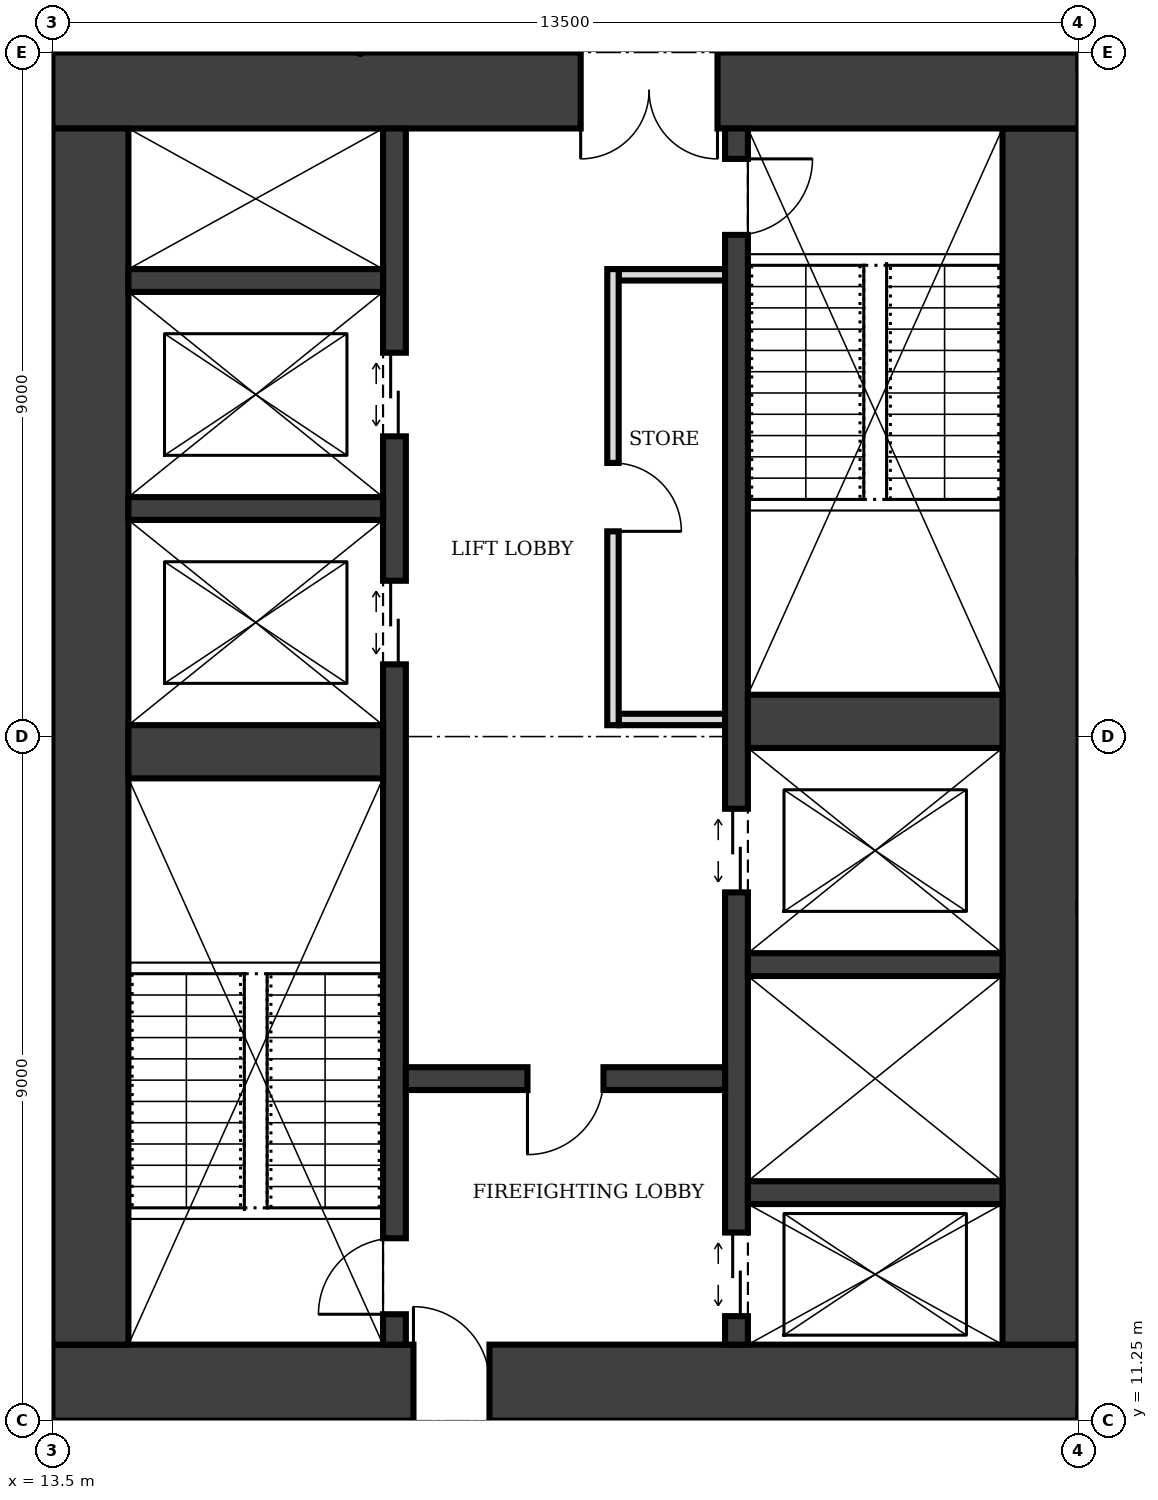
"""IFC4 building model, lengths in metres.
Left out: names, types, materials, properties, quantities, classifications, styles, units other than length and angle.
Written with IfcOpenShell. Run it as: python <this file> out.ifc"""

import sys

from ifc_helpers import new_model, si_unit, direction, frame, frame_2d, origin, place, context, subcontext, project, spatial, rectangle, extrude, element, fill, save


model = new_model("IFC4")
c1 = context("Model", 3, precision=1e-05, world=origin(), true_north=direction((0.0, 1.0)))
c2 = subcontext(c1, "Body", "Model", "MODEL_VIEW")
j1 = project(units=[si_unit("LENGTHUNIT", "METRE"), si_unit("PLANEANGLEUNIT", "RADIAN")], contexts=[c1])
p1 = place(None, origin())
s1 = spatial("IfcSite", under=j1, at=p1, CompositionType="ELEMENT")
p2 = place(p1, origin())
s2 = spatial("IfcBuilding", under=s1, at=p2, CompositionType="ELEMENT")
p3 = place(p2, frame((0.0, 0.0, 101.0)))
s3 = spatial("IfcBuildingStorey", under=s2, at=p3, CompositionType="ELEMENT", Elevation=101.0)
p4 = place(p3, frame((13.5, 11.75, 0.0), z_axis=(0.0, 0.0, 1.0), x_axis=(1.0, 0.0, 0.0)))
e1 = element("IfcWall", 1, at=p4, inside=s3, PredefinedType="SHEAR", context=c2, shape_type="SweptSolid", body=[
    extrude(rectangle(XDim=13.5, YDim=1.0, at=frame_2d((6.75, 0.0))), origin(), (0.0, 0.0, 1.0), 4.0),
])
p5 = place(p4, frame((4.75, 0.0, 0.0)))
e2 = element("IfcOpeningElement", 2, at=p5, cuts=e1, PredefinedType="OPENING", context=c2, shape_type="SweptSolid", body=[
    extrude(rectangle(XDim=1.0, YDim=2.1, at=frame_2d((0.5, 1.05))), frame((0.0, 0.51, 0.0), z_axis=(0.0, -1.0, 0.0), x_axis=(1.0, 0.0, 0.0)), (0.0, 0.0, 1.0), 1.02),
])
p6 = place(p3, frame((26.5, 12.25, 0.0), z_axis=(0.0, 0.0, 1.0), x_axis=(0.0, 1.0, 0.0)))
e3 = element("IfcWall", 3, at=p6, inside=s3, PredefinedType="SHEAR", context=c2, shape_type="SweptSolid", body=[
    extrude(rectangle(XDim=16.0, YDim=1.0, at=frame_2d((8.0, 0.0))), origin(), (0.0, 0.0, 1.0), 4.0),
])
p7 = place(p3, frame((27.0, 28.75, 0.0), z_axis=(0.0, 0.0, 1.0), x_axis=(-1.0, 0.0, 0.0)))
e4 = element("IfcWall", 4, at=p7, inside=s3, PredefinedType="SHEAR", context=c2, shape_type="SweptSolid", body=[
    extrude(rectangle(XDim=13.5, YDim=1.0, at=frame_2d((6.75, 0.0))), origin(), (0.0, 0.0, 1.0), 4.0),
])
p8 = place(p7, frame((4.75, 0.0, 0.0)))
e5 = element("IfcOpeningElement", 5, at=p8, cuts=e4, PredefinedType="OPENING", context=c2, shape_type="SweptSolid", body=[
    extrude(rectangle(XDim=1.8, YDim=2.1, at=frame_2d((0.9, 1.05))), frame((0.0, 0.51, 0.0), z_axis=(0.0, -1.0, 0.0), x_axis=(1.0, 0.0, 0.0)), (0.0, 0.0, 1.0), 1.02),
])
p9 = place(p3, frame((14.0, 28.25, 0.0), z_axis=(0.0, 0.0, 1.0), x_axis=(0.0, -1.0, 0.0)))
e6 = element("IfcWall", 6, at=p9, inside=s3, PredefinedType="SHEAR", context=c2, shape_type="SweptSolid", body=[
    extrude(rectangle(XDim=16.0, YDim=1.0, at=frame_2d((8.0, 0.0))), origin(), (0.0, 0.0, 1.0), 4.0),
])
p10 = place(p3, frame((18.0, 12.25, 0.0), z_axis=(0.0, 0.0, 1.0), x_axis=(0.0, 1.0, 0.0)))
e7 = element("IfcWall", 7, at=p10, inside=s3, PredefinedType="SHEAR", context=c2, shape_type="SweptSolid", body=[
    extrude(rectangle(XDim=16.0, YDim=0.3, at=frame_2d((8.0, 0.0))), origin(), (0.0, 0.0, 1.0), 4.0),
])
p11 = place(p10, frame((0.4, 0.0, 0.0)))
e8 = element("IfcOpeningElement", 8, at=p11, cuts=e7, PredefinedType="OPENING", context=c2, shape_type="SweptSolid", body=[
    extrude(rectangle(XDim=1.0, YDim=2.1, at=frame_2d((0.5, 1.05))), frame((0.0, 0.16, 0.0), z_axis=(0.0, -1.0, 0.0), x_axis=(1.0, 0.0, 0.0)), (0.0, 0.0, 1.0), 0.32),
])
p12 = place(p10, frame((8.95, 0.0, 0.0)))
e9 = element("IfcOpeningElement", 9, at=p12, cuts=e7, PredefinedType="OPENING", context=c2, shape_type="SweptSolid", body=[
    extrude(rectangle(XDim=1.1, YDim=2.1, at=frame_2d((0.55, 1.05))), frame((0.0, 0.16, 0.0), z_axis=(0.0, -1.0, 0.0), x_axis=(1.0, 0.0, 0.0)), (0.0, 0.0, 1.0), 0.32),
])
p13 = place(p10, frame((11.95, 0.0, 0.0)))
e10 = element("IfcOpeningElement", 10, at=p13, cuts=e7, PredefinedType="OPENING", context=c2, shape_type="SweptSolid", body=[
    extrude(rectangle(XDim=1.1, YDim=2.1, at=frame_2d((0.55, 1.05))), frame((0.0, 0.16, 0.0), z_axis=(0.0, -1.0, 0.0), x_axis=(1.0, 0.0, 0.0)), (0.0, 0.0, 1.0), 0.32),
])
p14 = place(p3, frame((22.5, 12.25, 0.0), z_axis=(0.0, 0.0, 1.0), x_axis=(0.0, 1.0, 0.0)))
e11 = element("IfcWall", 11, at=p14, inside=s3, PredefinedType="SHEAR", context=c2, shape_type="SweptSolid", body=[
    extrude(rectangle(XDim=16.0, YDim=0.3, at=frame_2d((8.0, 0.0))), origin(), (0.0, 0.0, 1.0), 4.0),
])
p15 = place(p14, frame((14.6, 0.0, 0.0)))
e12 = element("IfcOpeningElement", 12, at=p15, cuts=e11, PredefinedType="OPENING", context=c2, shape_type="SweptSolid", body=[
    extrude(rectangle(XDim=1.0, YDim=2.1, at=frame_2d((0.5, 1.05))), frame((0.0, 0.16, 0.0), z_axis=(0.0, -1.0, 0.0), x_axis=(1.0, 0.0, 0.0)), (0.0, 0.0, 1.0), 0.32),
])
p16 = place(p14, frame((0.375, 0.0, 0.0)))
e13 = element("IfcOpeningElement", 13, at=p16, cuts=e11, PredefinedType="OPENING", context=c2, shape_type="SweptSolid", body=[
    extrude(rectangle(XDim=1.1, YDim=2.1, at=frame_2d((0.55, 1.05))), frame((0.0, 0.16, 0.0), z_axis=(0.0, -1.0, 0.0), x_axis=(1.0, 0.0, 0.0)), (0.0, 0.0, 1.0), 0.32),
])
p17 = place(p14, frame((5.95, 0.0, 0.0)))
e14 = element("IfcOpeningElement", 14, at=p17, cuts=e11, PredefinedType="OPENING", context=c2, shape_type="SweptSolid", body=[
    extrude(rectangle(XDim=1.1, YDim=2.1, at=frame_2d((0.55, 1.05))), frame((0.0, 0.16, 0.0), z_axis=(0.0, -1.0, 0.0), x_axis=(1.0, 0.0, 0.0)), (0.0, 0.0, 1.0), 0.32),
])
p18 = place(p3, frame((14.5, 20.05, 0.0), z_axis=(0.0, 0.0, 1.0), x_axis=(1.0, 0.0, 0.0)))
e15 = element("IfcWall", 15, at=p18, inside=s3, PredefinedType="SHEAR", context=c2, shape_type="SweptSolid", body=[
    extrude(rectangle(XDim=3.35, YDim=0.7, at=frame_2d((1.675, 0.0))), origin(), (0.0, 0.0, 1.0), 4.0),
])
p19 = place(p3, frame((18.15, 15.75, 0.0), z_axis=(0.0, 0.0, 1.0), x_axis=(1.0, 0.0, 0.0)))
e16 = element("IfcWall", 16, at=p19, inside=s3, PredefinedType="SHEAR", context=c2, shape_type="SweptSolid", body=[
    extrude(rectangle(XDim=4.2, YDim=0.3, at=frame_2d((2.1, 0.0))), origin(), (0.0, 0.0, 1.0), 4.0),
])
p20 = place(p19, frame((1.6, 0.0, 0.0)))
e17 = element("IfcOpeningElement", 17, at=p20, cuts=e16, PredefinedType="OPENING", context=c2, shape_type="SweptSolid", body=[
    extrude(rectangle(XDim=1.0, YDim=2.1, at=frame_2d((0.5, 1.05))), frame((0.0, 0.16, 0.0), z_axis=(0.0, -1.0, 0.0), x_axis=(1.0, 0.0, 0.0)), (0.0, 0.0, 1.0), 0.32),
])
for number, where, z_axis, x_axis in (
    (18, (22.65, 14.25, 0.0), (0.0, 0.0, 1.0), (1.0, 0.0, 0.0)),
    (19, (22.65, 17.25, 0.0), (0.0, 0.0, 1.0), (1.0, 0.0, 0.0)),
):
    element("IfcWall", number, at=place(p3, frame(where, z_axis=z_axis, x_axis=x_axis)), inside=s3, PredefinedType="SHEAR", context=c2, shape_type="SweptSolid", body=[
        extrude(rectangle(XDim=3.35, YDim=0.3, at=frame_2d((1.675, 0.0))), origin(), (0.0, 0.0, 1.0), 4.0),
    ])
p21 = place(p3, frame((22.65, 20.45, 0.0), z_axis=(0.0, 0.0, 1.0), x_axis=(1.0, 0.0, 0.0)))
e20 = element("IfcWall", 20, at=p21, inside=s3, PredefinedType="SHEAR", context=c2, shape_type="SweptSolid", body=[
    extrude(rectangle(XDim=3.35, YDim=0.7, at=frame_2d((1.675, 0.0))), origin(), (0.0, 0.0, 1.0), 4.0),
])
for number, where, z_axis, x_axis in (
    (21, (14.5, 23.25, 0.0), (0.0, 0.0, 1.0), (1.0, 0.0, 0.0)),
    (22, (14.5, 26.25, 0.0), (0.0, 0.0, 1.0), (1.0, 0.0, 0.0)),
):
    element("IfcWall", number, at=place(p3, frame(where, z_axis=z_axis, x_axis=x_axis)), inside=s3, PredefinedType="SHEAR", context=c2, shape_type="SweptSolid", body=[
        extrude(rectangle(XDim=3.35, YDim=0.3, at=frame_2d((1.675, 0.0))), origin(), (0.0, 0.0, 1.0), 4.0),
    ])
p22 = place(p3, frame((20.875, 20.4, 0.0), z_axis=(0.0, 0.0, 1.0), x_axis=(0.0, 1.0, 0.0)))
e23 = element("IfcWall", 23, at=p22, inside=s3, PredefinedType="PARTITIONING", context=c2, shape_type="SweptSolid", body=[
    extrude(rectangle(XDim=6.0, YDim=0.15, at=frame_2d((3.0, 0.0))), origin(), (0.0, 0.0, 1.0), 3.75),
])
p23 = place(p22, frame((2.55, 0.0, 0.0)))
e24 = element("IfcOpeningElement", 24, at=p23, cuts=e23, PredefinedType="OPENING", context=c2, shape_type="SweptSolid", body=[
    extrude(rectangle(XDim=0.9, YDim=2.1, at=frame_2d((0.45, 1.05))), frame((0.0, 0.085, 0.0), z_axis=(0.0, -1.0, 0.0), x_axis=(1.0, 0.0, 0.0)), (0.0, 0.0, 1.0), 0.17),
])
for number, where, z_axis, x_axis in (
    (25, (20.95, 20.475, 0.0), (0.0, 0.0, 1.0), (1.0, 0.0, 0.0)),
    (26, (20.95, 26.325, 0.0), (0.0, 0.0, 1.0), (1.0, 0.0, 0.0)),
):
    element("IfcWall", number, at=place(p3, frame(where, z_axis=z_axis, x_axis=x_axis)), inside=s3, PredefinedType="PARTITIONING", context=c2, shape_type="SweptSolid", body=[
        extrude(rectangle(XDim=1.4, YDim=0.15, at=frame_2d((0.7, 0.0))), origin(), (0.0, 0.0, 1.0), 3.75),
    ])
p24 = place(p5, origin())
e27 = element("IfcDoor", 27, at=p24, inside=s3, OperationType="SINGLE_SWING_LEFT", PredefinedType="DOOR", context=c2, shape_type="SweptSolid", body=[
    extrude(rectangle(XDim=1.0, YDim=2.1, at=frame_2d((0.5, 1.05))), frame((0.0, 0.025, 0.0), z_axis=(0.0, -1.0, 0.0), x_axis=(1.0, 0.0, 0.0)), (0.0, 0.0, 1.0), 0.05),
])
fill(e2, e27)
p25 = place(p8, origin())
e28 = element("IfcDoor", 28, at=p25, inside=s3, OperationType="DOUBLE_DOOR_SINGLE_SWING", PredefinedType="DOOR", context=c2, shape_type="SweptSolid", body=[
    extrude(rectangle(XDim=1.8, YDim=2.1, at=frame_2d((0.9, 1.05))), frame((0.0, 0.025, 0.0), z_axis=(0.0, -1.0, 0.0), x_axis=(1.0, 0.0, 0.0)), (0.0, 0.0, 1.0), 0.05),
])
fill(e5, e28)
p26 = place(p20, frame((1.0, 0.0, 0.0), z_axis=(0.0, 0.0, 1.0), x_axis=(-1.0, 0.0, 0.0)))
e29 = element("IfcDoor", 29, at=p26, inside=s3, OperationType="SINGLE_SWING_RIGHT", PredefinedType="DOOR", context=c2, shape_type="SweptSolid", body=[
    extrude(rectangle(XDim=1.0, YDim=2.1, at=frame_2d((0.5, 1.05))), frame((0.0, 0.025, 0.0), z_axis=(0.0, -1.0, 0.0), x_axis=(1.0, 0.0, 0.0)), (0.0, 0.0, 1.0), 0.05),
])
fill(e17, e29)
p27 = place(p11, origin())
e30 = element("IfcDoor", 30, at=p27, inside=s3, OperationType="SINGLE_SWING_LEFT", PredefinedType="DOOR", context=c2, shape_type="SweptSolid", body=[
    extrude(rectangle(XDim=1.0, YDim=2.1, at=frame_2d((0.5, 1.05))), frame((0.0, 0.025, 0.0), z_axis=(0.0, -1.0, 0.0), x_axis=(1.0, 0.0, 0.0)), (0.0, 0.0, 1.0), 0.05),
])
fill(e8, e30)
p28 = place(p15, frame((1.0, 0.0, 0.0), z_axis=(0.0, 0.0, 1.0), x_axis=(-1.0, 0.0, 0.0)))
e31 = element("IfcDoor", 31, at=p28, inside=s3, OperationType="SINGLE_SWING_LEFT", PredefinedType="DOOR", context=c2, shape_type="SweptSolid", body=[
    extrude(rectangle(XDim=1.0, YDim=2.1, at=frame_2d((0.5, 1.05))), frame((0.0, 0.025, 0.0), z_axis=(0.0, -1.0, 0.0), x_axis=(1.0, 0.0, 0.0)), (0.0, 0.0, 1.0), 0.05),
])
fill(e12, e31)
p29 = place(p16, origin())
e32 = element("IfcDoor", 32, at=p29, inside=s3, OperationType="DOUBLE_DOOR_SLIDING", PredefinedType="DOOR", context=c2, shape_type="SweptSolid", body=[
    extrude(rectangle(XDim=1.1, YDim=2.1, at=frame_2d((0.55, 1.05))), frame((0.0, 0.025, 0.0), z_axis=(0.0, -1.0, 0.0), x_axis=(1.0, 0.0, 0.0)), (0.0, 0.0, 1.0), 0.05),
])
fill(e13, e32)
p30 = place(p12, origin())
e33 = element("IfcDoor", 33, at=p30, inside=s3, OperationType="DOUBLE_DOOR_SLIDING", PredefinedType="DOOR", context=c2, shape_type="SweptSolid", body=[
    extrude(rectangle(XDim=1.1, YDim=2.1, at=frame_2d((0.55, 1.05))), frame((0.0, 0.025, 0.0), z_axis=(0.0, -1.0, 0.0), x_axis=(1.0, 0.0, 0.0)), (0.0, 0.0, 1.0), 0.05),
])
fill(e9, e33)
p31 = place(p13, origin())
e34 = element("IfcDoor", 34, at=p31, inside=s3, OperationType="DOUBLE_DOOR_SLIDING", PredefinedType="DOOR", context=c2, shape_type="SweptSolid", body=[
    extrude(rectangle(XDim=1.1, YDim=2.1, at=frame_2d((0.55, 1.05))), frame((0.0, 0.025, 0.0), z_axis=(0.0, -1.0, 0.0), x_axis=(1.0, 0.0, 0.0)), (0.0, 0.0, 1.0), 0.05),
])
fill(e10, e34)
p32 = place(p17, origin())
e35 = element("IfcDoor", 35, at=p32, inside=s3, OperationType="DOUBLE_DOOR_SLIDING", PredefinedType="DOOR", context=c2, shape_type="SweptSolid", body=[
    extrude(rectangle(XDim=1.1, YDim=2.1, at=frame_2d((0.55, 1.05))), frame((0.0, 0.025, 0.0), z_axis=(0.0, -1.0, 0.0), x_axis=(1.0, 0.0, 0.0)), (0.0, 0.0, 1.0), 0.05),
])
fill(e14, e35)
p33 = place(p23, frame((0.9, 0.0, 0.0), z_axis=(0.0, 0.0, 1.0), x_axis=(-1.0, 0.0, 0.0)))
e36 = element("IfcDoor", 36, at=p33, inside=s3, OperationType="SINGLE_SWING_RIGHT", PredefinedType="DOOR", context=c2, shape_type="SweptSolid", body=[
    extrude(rectangle(XDim=0.9, YDim=2.1, at=frame_2d((0.45, 1.05))), frame((0.0, 0.025, 0.0), z_axis=(0.0, -1.0, 0.0), x_axis=(1.0, 0.0, 0.0)), (0.0, 0.0, 1.0), 0.05),
])
fill(e24, e36)
save(model, sys.argv[1])
